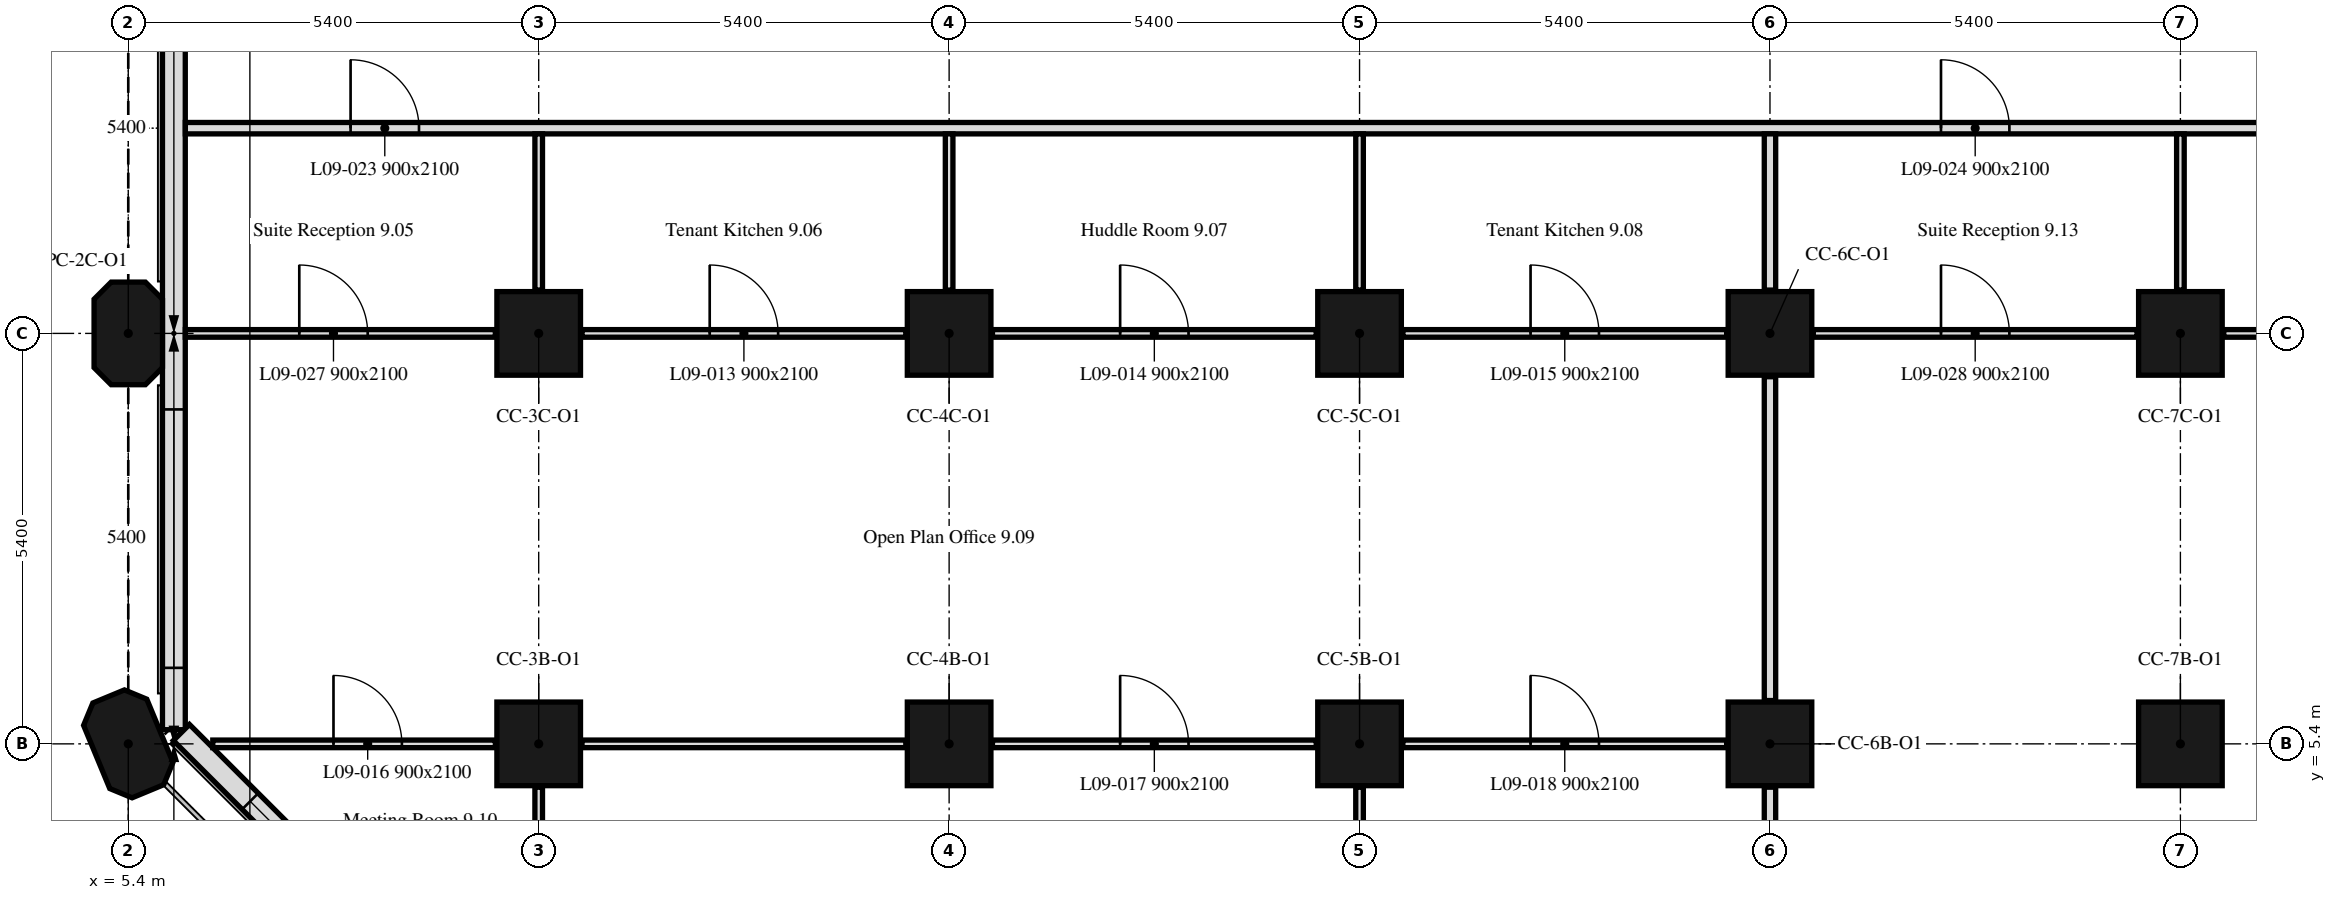
"""IFC4 building model, lengths in metres.
Left out: names, types, materials, properties, quantities, classifications, styles, units other than length and angle.
Written with IfcOpenShell. Run it as: python <this file> out.ifc"""

import sys

from ifc_helpers import new_model, si_unit, direction, frame, frame_2d, origin, origin_2d, place, context, subcontext, project, spatial, polyline, rectangle, outline, extrude, element, fill, save


model = new_model("IFC4")
c1 = context("Model", 3, precision=1e-05, world=origin(), true_north=direction((0.0, 1.0)))
c2 = subcontext(c1, "Body", "Model", "MODEL_VIEW")
j1 = project(units=[si_unit("LENGTHUNIT", "METRE"), si_unit("PLANEANGLEUNIT", "RADIAN")], contexts=[c1])
p1 = place(None, origin())
s1 = spatial("IfcSite", under=j1, at=p1, CompositionType="ELEMENT")
p2 = place(p1, origin())
s2 = spatial("IfcBuilding", under=s1, at=p2, CompositionType="ELEMENT")
p3 = place(p2, frame((0.0, 0.0, 45.0)))
s3 = spatial("IfcBuildingStorey", under=s2, at=p3, CompositionType="ELEMENT", Elevation=45.0)
p4 = place(p3, frame((5.4, 5.4, 0.0), z_axis=(0.0, 0.0, 1.0), x_axis=(-0.382683432365, 0.923879532511, 0.0)))
e1 = element("IfcColumn", 1, at=p4, inside=s3, PredefinedType="COLUMN", context=c2, shape_type="SweptSolid", body=[
    extrude(outline(polyline([(-0.45, -0.45), (0.45, -0.45), (0.675, -0.225), (0.675, 0.225), (0.45, 0.45), (-0.45, 0.45), (-0.675, 0.225), (-0.675, -0.225), (-0.45, -0.45)])), origin(), (0.0, 0.0, 1.0), 3.5),
])
for number, where, z_axis, x_axis in (
    (2, (10.8, 5.4, 0.0), (0.0, 0.0, 1.0), (1.0, 0.0, 0.0)),
    (3, (16.2, 5.4, 0.0), (0.0, 0.0, 1.0), (1.0, 0.0, 0.0)),
    (4, (21.6, 5.4, 0.0), (0.0, 0.0, 1.0), (1.0, 0.0, 0.0)),
    (5, (27.0, 5.4, 0.0), (0.0, 0.0, 1.0), (1.0, 0.0, 0.0)),
    (6, (32.4, 5.4, 0.0), (0.0, 0.0, 1.0), (1.0, 0.0, 0.0)),
):
    element("IfcColumn", number, at=place(p3, frame(where, z_axis=z_axis, x_axis=x_axis)), inside=s3, PredefinedType="COLUMN", context=c2, shape_type="SweptSolid", body=[
        extrude(rectangle(XDim=1.1, YDim=1.1, at=origin_2d()), origin(), (0.0, 0.0, 1.0), 3.5),
    ])
p5 = place(p3, frame((5.4, 10.8, 0.0), z_axis=(0.0, 0.0, 1.0), x_axis=(0.0, 1.0, 0.0)))
e7 = element("IfcColumn", 7, at=p5, inside=s3, PredefinedType="COLUMN", context=c2, shape_type="SweptSolid", body=[
    extrude(outline(polyline([(-0.45, -0.45), (0.45, -0.45), (0.675, -0.225), (0.675, 0.225), (0.45, 0.45), (-0.45, 0.45), (-0.675, 0.225), (-0.675, -0.225), (-0.45, -0.45)])), origin(), (0.0, 0.0, 1.0), 3.5),
])
for number, where, z_axis, x_axis in (
    (8, (10.8, 10.8, 0.0), (0.0, 0.0, 1.0), (1.0, 0.0, 0.0)),
    (9, (16.2, 10.8, 0.0), (0.0, 0.0, 1.0), (1.0, 0.0, 0.0)),
    (10, (21.6, 10.8, 0.0), (0.0, 0.0, 1.0), (1.0, 0.0, 0.0)),
    (11, (27.0, 10.8, 0.0), (0.0, 0.0, 1.0), (1.0, 0.0, 0.0)),
    (12, (32.4, 10.8, 0.0), (0.0, 0.0, 1.0), (1.0, 0.0, 0.0)),
):
    element("IfcColumn", number, at=place(p3, frame(where, z_axis=z_axis, x_axis=x_axis)), inside=s3, PredefinedType="COLUMN", context=c2, shape_type="SweptSolid", body=[
        extrude(rectangle(XDim=1.1, YDim=1.1, at=origin_2d()), origin(), (0.0, 0.0, 1.0), 3.5),
    ])
p6 = place(p3, frame((6.0, 16.2, 0.0), z_axis=(0.0, 0.0, 1.0), x_axis=(0.0, -1.0, 0.0)))
e13 = element("IfcWall", 13, at=p6, inside=s3, PredefinedType="SOLIDWALL", context=c2, shape_type="SweptSolid", body=[
    extrude(rectangle(XDim=10.614, YDim=0.3, at=frame_2d((5.307, 0.0))), origin(), (0.0, 0.0, 1.0), 3.5),
])
p7 = place(p6, frame((6.4, 0.0, 0.9)))
e14 = element("IfcOpeningElement", 14, at=p7, cuts=e13, PredefinedType="OPENING", context=c2, shape_type="SweptSolid", body=[
    extrude(rectangle(XDim=3.4, YDim=1.7, at=frame_2d((1.7, 0.85))), frame((0.0, 0.16, 0.0), z_axis=(0.0, -1.0, 0.0), x_axis=(1.0, 0.0, 0.0)), (0.0, 0.0, 1.0), 0.32),
])
p8 = place(p3, frame((6.099, 5.55, 0.0), z_axis=(0.0, 0.0, 1.0), x_axis=(0.707106781187, -0.707106781187, 0.0)))
e15 = element("IfcWall", 15, at=p8, inside=s3, PredefinedType="SOLIDWALL", context=c2, shape_type="SweptSolid", body=[
    extrude(rectangle(XDim=6.86, YDim=0.3, at=frame_2d((3.43, 0.0))), origin(), (0.0, 0.0, 1.0), 3.5),
])
p9 = place(p8, frame((1.28, 0.0, 0.9)))
e16 = element("IfcOpeningElement", 16, at=p9, cuts=e15, PredefinedType="OPENING", context=c2, shape_type="SweptSolid", body=[
    extrude(rectangle(XDim=1.1, YDim=1.7, at=frame_2d((0.55, 0.85))), frame((0.0, 0.16, 0.0), z_axis=(0.0, -1.0, 0.0), x_axis=(1.0, 0.0, 0.0)), (0.0, 0.0, 1.0), 0.32),
])
p10 = place(p8, frame((4.48, 0.0, 0.9)))
e17 = element("IfcOpeningElement", 17, at=p10, cuts=e15, PredefinedType="OPENING", context=c2, shape_type="SweptSolid", body=[
    extrude(rectangle(XDim=1.1, YDim=1.7, at=frame_2d((0.55, 0.85))), frame((0.0, 0.16, 0.0), z_axis=(0.0, -1.0, 0.0), x_axis=(1.0, 0.0, 0.0)), (0.0, 0.0, 1.0), 0.32),
])
p11 = place(p3, frame((6.151, 13.5, 0.0), z_axis=(0.0, 0.0, 1.0), x_axis=(1.0, 0.0, 0.0)))
e18 = element("IfcWall", 18, at=p11, inside=s3, PredefinedType="PARTITIONING", context=c2, shape_type="SweptSolid", body=[
    extrude(rectangle(XDim=41.698, YDim=0.15, at=frame_2d((20.849, 0.0))), origin(), (0.0, 0.0, 1.0), 2.75),
])
p12 = place(p11, frame((2.174, 0.0, 0.0)))
e19 = element("IfcOpeningElement", 19, at=p12, cuts=e18, PredefinedType="OPENING", context=c2, shape_type="SweptSolid", body=[
    extrude(rectangle(XDim=0.9, YDim=2.1, at=frame_2d((0.45, 1.05))), frame((0.0, 0.075, 0.0), z_axis=(0.0, -1.0, 0.0), x_axis=(1.0, 0.0, 0.0)), (0.0, 0.0, 1.0), 0.15),
])
p13 = place(p11, frame((23.099, 0.0, 0.0)))
e20 = element("IfcOpeningElement", 20, at=p13, cuts=e18, PredefinedType="OPENING", context=c2, shape_type="SweptSolid", body=[
    extrude(rectangle(XDim=0.9, YDim=2.1, at=frame_2d((0.45, 1.05))), frame((0.0, 0.075, 0.0), z_axis=(0.0, -1.0, 0.0), x_axis=(1.0, 0.0, 0.0)), (0.0, 0.0, 1.0), 0.15),
])
p14 = place(p3, frame((6.151, 10.8, 0.0), z_axis=(0.0, 0.0, 1.0), x_axis=(1.0, 0.0, 0.0)))
e21 = element("IfcWall", 21, at=p14, inside=s3, PredefinedType="PARTITIONING", context=c2, shape_type="SweptSolid", body=[
    extrude(rectangle(XDim=4.079, YDim=0.1, at=frame_2d((2.04, 0.0))), origin(), (0.0, 0.0, 1.0), 3.5),
])
p15 = place(p14, frame((1.499, 0.0, 0.0)))
e22 = element("IfcOpeningElement", 22, at=p15, cuts=e21, PredefinedType="OPENING", context=c2, shape_type="SweptSolid", body=[
    extrude(rectangle(XDim=0.9, YDim=2.1, at=frame_2d((0.45, 1.05))), frame((0.0, 0.05, 0.0), z_axis=(0.0, -1.0, 0.0), x_axis=(1.0, 0.0, 0.0)), (0.0, 0.0, 1.0), 0.1),
])
p16 = place(p3, frame((10.8, 11.37, 0.0), z_axis=(0.0, 0.0, 1.0), x_axis=(0.0, 1.0, 0.0)))
e23 = element("IfcWall", 23, at=p16, inside=s3, PredefinedType="PARTITIONING", context=c2, shape_type="SweptSolid", body=[
    extrude(rectangle(XDim=2.055, YDim=0.1, at=frame_2d((1.027, 0.0))), origin(), (0.0, 0.0, 1.0), 3.5),
])
p17 = place(p3, frame((11.37, 10.8, 0.0), z_axis=(0.0, 0.0, 1.0), x_axis=(1.0, 0.0, 0.0)))
e24 = element("IfcWall", 24, at=p17, inside=s3, PredefinedType="PARTITIONING", context=c2, shape_type="SweptSolid", body=[
    extrude(rectangle(XDim=4.26, YDim=0.1, at=frame_2d((2.13, 0.0))), origin(), (0.0, 0.0, 1.0), 3.5),
])
p18 = place(p17, frame((1.68, 0.0, 0.0)))
e25 = element("IfcOpeningElement", 25, at=p18, cuts=e24, PredefinedType="OPENING", context=c2, shape_type="SweptSolid", body=[
    extrude(rectangle(XDim=0.9, YDim=2.1, at=frame_2d((0.45, 1.05))), frame((0.0, 0.05, 0.0), z_axis=(0.0, -1.0, 0.0), x_axis=(1.0, 0.0, 0.0)), (0.0, 0.0, 1.0), 0.1),
])
p19 = place(p3, frame((16.2, 11.37, 0.0), z_axis=(0.0, 0.0, 1.0), x_axis=(0.0, 1.0, 0.0)))
e26 = element("IfcWall", 26, at=p19, inside=s3, PredefinedType="PARTITIONING", context=c2, shape_type="SweptSolid", body=[
    extrude(rectangle(XDim=2.055, YDim=0.1, at=frame_2d((1.027, 0.0))), origin(), (0.0, 0.0, 1.0), 2.75),
])
p20 = place(p3, frame((16.77, 10.8, 0.0), z_axis=(0.0, 0.0, 1.0), x_axis=(1.0, 0.0, 0.0)))
e27 = element("IfcWall", 27, at=p20, inside=s3, PredefinedType="PARTITIONING", context=c2, shape_type="SweptSolid", body=[
    extrude(rectangle(XDim=4.26, YDim=0.1, at=frame_2d((2.13, 0.0))), origin(), (0.0, 0.0, 1.0), 3.5),
])
p21 = place(p20, frame((1.68, 0.0, 0.0)))
e28 = element("IfcOpeningElement", 28, at=p21, cuts=e27, PredefinedType="OPENING", context=c2, shape_type="SweptSolid", body=[
    extrude(rectangle(XDim=0.9, YDim=2.1, at=frame_2d((0.45, 1.05))), frame((0.0, 0.05, 0.0), z_axis=(0.0, -1.0, 0.0), x_axis=(1.0, 0.0, 0.0)), (0.0, 0.0, 1.0), 0.1),
])
p22 = place(p3, frame((21.6, 11.37, 0.0), z_axis=(0.0, 0.0, 1.0), x_axis=(0.0, 1.0, 0.0)))
e29 = element("IfcWall", 29, at=p22, inside=s3, PredefinedType="PARTITIONING", context=c2, shape_type="SweptSolid", body=[
    extrude(rectangle(XDim=2.055, YDim=0.1, at=frame_2d((1.027, 0.0))), origin(), (0.0, 0.0, 1.0), 2.75),
])
p23 = place(p3, frame((22.17, 10.8, 0.0), z_axis=(0.0, 0.0, 1.0), x_axis=(1.0, 0.0, 0.0)))
e30 = element("IfcWall", 30, at=p23, inside=s3, PredefinedType="PARTITIONING", context=c2, shape_type="SweptSolid", body=[
    extrude(rectangle(XDim=4.26, YDim=0.1, at=frame_2d((2.13, 0.0))), origin(), (0.0, 0.0, 1.0), 3.5),
])
p24 = place(p23, frame((1.68, 0.0, 0.0)))
e31 = element("IfcOpeningElement", 31, at=p24, cuts=e30, PredefinedType="OPENING", context=c2, shape_type="SweptSolid", body=[
    extrude(rectangle(XDim=0.9, YDim=2.1, at=frame_2d((0.45, 1.05))), frame((0.0, 0.05, 0.0), z_axis=(0.0, -1.0, 0.0), x_axis=(1.0, 0.0, 0.0)), (0.0, 0.0, 1.0), 0.1),
])
p25 = place(p3, frame((27.0, 11.37, 0.0), z_axis=(0.0, 0.0, 1.0), x_axis=(0.0, 1.0, 0.0)))
e32 = element("IfcWall", 32, at=p25, inside=s3, PredefinedType="PARTITIONING", context=c2, shape_type="SweptSolid", body=[
    extrude(rectangle(XDim=2.055, YDim=0.15, at=frame_2d((1.027, 0.0))), origin(), (0.0, 0.0, 1.0), 2.75),
])
p26 = place(p3, frame((6.512, 5.4, 0.0), z_axis=(0.0, 0.0, 1.0), x_axis=(1.0, 0.0, 0.0)))
e33 = element("IfcWall", 33, at=p26, inside=s3, PredefinedType="PARTITIONING", context=c2, shape_type="SweptSolid", body=[
    extrude(rectangle(XDim=3.718, YDim=0.1, at=frame_2d((1.859, 0.0))), origin(), (0.0, 0.0, 1.0), 3.5),
])
p27 = place(p26, frame((1.588, 0.0, 0.0)))
e34 = element("IfcOpeningElement", 34, at=p27, cuts=e33, PredefinedType="OPENING", context=c2, shape_type="SweptSolid", body=[
    extrude(rectangle(XDim=0.9, YDim=2.1, at=frame_2d((0.45, 1.05))), frame((0.0, 0.05, 0.0), z_axis=(0.0, -1.0, 0.0), x_axis=(1.0, 0.0, 0.0)), (0.0, 0.0, 1.0), 0.1),
])
p28 = place(p3, frame((11.37, 5.4, 0.0), z_axis=(0.0, 0.0, 1.0), x_axis=(1.0, 0.0, 0.0)))
e35 = element("IfcWall", 35, at=p28, inside=s3, PredefinedType="PARTITIONING", context=c2, shape_type="SweptSolid", body=[
    extrude(rectangle(XDim=4.26, YDim=0.1, at=frame_2d((2.13, 0.0))), origin(), (0.0, 0.0, 1.0), 3.5),
])
p29 = place(p3, frame((16.77, 5.4, 0.0), z_axis=(0.0, 0.0, 1.0), x_axis=(1.0, 0.0, 0.0)))
e36 = element("IfcWall", 36, at=p29, inside=s3, PredefinedType="PARTITIONING", context=c2, shape_type="SweptSolid", body=[
    extrude(rectangle(XDim=4.26, YDim=0.1, at=frame_2d((2.13, 0.0))), origin(), (0.0, 0.0, 1.0), 3.5),
])
p30 = place(p29, frame((1.68, 0.0, 0.0)))
e37 = element("IfcOpeningElement", 37, at=p30, cuts=e36, PredefinedType="OPENING", context=c2, shape_type="SweptSolid", body=[
    extrude(rectangle(XDim=0.9, YDim=2.1, at=frame_2d((0.45, 1.05))), frame((0.0, 0.05, 0.0), z_axis=(0.0, -1.0, 0.0), x_axis=(1.0, 0.0, 0.0)), (0.0, 0.0, 1.0), 0.1),
])
p31 = place(p3, frame((22.17, 5.4, 0.0), z_axis=(0.0, 0.0, 1.0), x_axis=(1.0, 0.0, 0.0)))
e38 = element("IfcWall", 38, at=p31, inside=s3, PredefinedType="PARTITIONING", context=c2, shape_type="SweptSolid", body=[
    extrude(rectangle(XDim=4.26, YDim=0.1, at=frame_2d((2.13, 0.0))), origin(), (0.0, 0.0, 1.0), 3.5),
])
p32 = place(p31, frame((1.68, 0.0, 0.0)))
e39 = element("IfcOpeningElement", 39, at=p32, cuts=e38, PredefinedType="OPENING", context=c2, shape_type="SweptSolid", body=[
    extrude(rectangle(XDim=0.9, YDim=2.1, at=frame_2d((0.45, 1.05))), frame((0.0, 0.05, 0.0), z_axis=(0.0, -1.0, 0.0), x_axis=(1.0, 0.0, 0.0)), (0.0, 0.0, 1.0), 0.1),
])
p33 = place(p3, frame((27.0, 5.97, 0.0), z_axis=(0.0, 0.0, 1.0), x_axis=(0.0, 1.0, 0.0)))
e40 = element("IfcWall", 40, at=p33, inside=s3, PredefinedType="PARTITIONING", context=c2, shape_type="SweptSolid", body=[
    extrude(rectangle(XDim=4.26, YDim=0.15, at=frame_2d((2.13, 0.0))), origin(), (0.0, 0.0, 1.0), 2.75),
])
p34 = place(p3, frame((10.8, 1.112, 0.0), z_axis=(0.0, 0.0, 1.0), x_axis=(0.0, 1.0, 0.0)))
e41 = element("IfcWall", 41, at=p34, inside=s3, PredefinedType="PARTITIONING", context=c2, shape_type="SweptSolid", body=[
    extrude(rectangle(XDim=3.718, YDim=0.1, at=frame_2d((1.859, 0.0))), origin(), (0.0, 0.0, 1.0), 3.5),
])
p35 = place(p3, frame((21.6, 0.751, 0.0), z_axis=(0.0, 0.0, 1.0), x_axis=(0.0, 1.0, 0.0)))
e42 = element("IfcWall", 42, at=p35, inside=s3, PredefinedType="PARTITIONING", context=c2, shape_type="SweptSolid", body=[
    extrude(rectangle(XDim=4.079, YDim=0.1, at=frame_2d((2.04, 0.0))), origin(), (0.0, 0.0, 1.0), 2.75),
])
p36 = place(p3, frame((27.0, 0.751, 0.0), z_axis=(0.0, 0.0, 1.0), x_axis=(0.0, 1.0, 0.0)))
e43 = element("IfcWall", 43, at=p36, inside=s3, PredefinedType="PARTITIONING", context=c2, shape_type="SweptSolid", body=[
    extrude(rectangle(XDim=4.079, YDim=0.15, at=frame_2d((2.04, 0.0))), origin(), (0.0, 0.0, 1.0), 2.75),
])
p37 = place(p3, frame((27.57, 10.8, 0.0), z_axis=(0.0, 0.0, 1.0), x_axis=(1.0, 0.0, 0.0)))
e44 = element("IfcWall", 44, at=p37, inside=s3, PredefinedType="PARTITIONING", context=c2, shape_type="SweptSolid", body=[
    extrude(rectangle(XDim=4.26, YDim=0.1, at=frame_2d((2.13, 0.0))), origin(), (0.0, 0.0, 1.0), 3.5),
])
p38 = place(p37, frame((1.68, 0.0, 0.0)))
e45 = element("IfcOpeningElement", 45, at=p38, cuts=e44, PredefinedType="OPENING", context=c2, shape_type="SweptSolid", body=[
    extrude(rectangle(XDim=0.9, YDim=2.1, at=frame_2d((0.45, 1.05))), frame((0.0, 0.05, 0.0), z_axis=(0.0, -1.0, 0.0), x_axis=(1.0, 0.0, 0.0)), (0.0, 0.0, 1.0), 0.1),
])
p39 = place(p3, frame((32.4, 11.37, 0.0), z_axis=(0.0, 0.0, 1.0), x_axis=(0.0, 1.0, 0.0)))
e46 = element("IfcWall", 46, at=p39, inside=s3, PredefinedType="PARTITIONING", context=c2, shape_type="SweptSolid", body=[
    extrude(rectangle(XDim=2.055, YDim=0.1, at=frame_2d((1.027, 0.0))), origin(), (0.0, 0.0, 1.0), 2.75),
])
p40 = place(p3, frame((32.97, 10.8, 0.0), z_axis=(0.0, 0.0, 1.0), x_axis=(1.0, 0.0, 0.0)))
e47 = element("IfcWall", 47, at=p40, inside=s3, PredefinedType="PARTITIONING", context=c2, shape_type="SweptSolid", body=[
    extrude(rectangle(XDim=4.26, YDim=0.1, at=frame_2d((2.13, 0.0))), origin(), (0.0, 0.0, 1.0), 2.75),
])
p41 = place(p40, frame((1.68, 0.0, 0.0)))
e48 = element("IfcOpeningElement", 48, at=p41, cuts=e47, PredefinedType="OPENING", context=c2, shape_type="SweptSolid", body=[
    extrude(rectangle(XDim=0.9, YDim=2.1, at=frame_2d((0.45, 1.05))), frame((0.0, 0.05, 0.0), z_axis=(0.0, -1.0, 0.0), x_axis=(1.0, 0.0, 0.0)), (0.0, 0.0, 1.0), 0.1),
])
p42 = place(p7, origin())
e49 = element("IfcWindow", 49, at=p42, inside=s3, PartitioningType="SINGLE_PANEL", PredefinedType="WINDOW", context=c2, shape_type="SweptSolid", body=[
    extrude(rectangle(XDim=3.4, YDim=1.7, at=frame_2d((1.7, 0.85))), frame((0.0, 0.03, 0.0), z_axis=(0.0, -1.0, 0.0), x_axis=(1.0, 0.0, 0.0)), (0.0, 0.0, 1.0), 0.06),
])
fill(e14, e49)
p43 = place(p9, origin())
e50 = element("IfcWindow", 50, at=p43, inside=s3, PartitioningType="SINGLE_PANEL", PredefinedType="WINDOW", context=c2, shape_type="SweptSolid", body=[
    extrude(rectangle(XDim=1.1, YDim=1.7, at=frame_2d((0.55, 0.85))), frame((0.0, 0.03, 0.0), z_axis=(0.0, -1.0, 0.0), x_axis=(1.0, 0.0, 0.0)), (0.0, 0.0, 1.0), 0.06),
])
fill(e16, e50)
p44 = place(p18, origin())
e51 = element("IfcDoor", 51, at=p44, inside=s3, OperationType="SINGLE_SWING_LEFT", PredefinedType="DOOR", context=c2, shape_type="SweptSolid", body=[
    extrude(rectangle(XDim=0.9, YDim=2.1, at=frame_2d((0.45, 1.05))), frame((0.0, 0.025, 0.0), z_axis=(0.0, -1.0, 0.0), x_axis=(1.0, 0.0, 0.0)), (0.0, 0.0, 1.0), 0.05),
])
fill(e25, e51)
p45 = place(p21, origin())
e52 = element("IfcDoor", 52, at=p45, inside=s3, OperationType="SINGLE_SWING_LEFT", PredefinedType="DOOR", context=c2, shape_type="SweptSolid", body=[
    extrude(rectangle(XDim=0.9, YDim=2.1, at=frame_2d((0.45, 1.05))), frame((0.0, 0.025, 0.0), z_axis=(0.0, -1.0, 0.0), x_axis=(1.0, 0.0, 0.0)), (0.0, 0.0, 1.0), 0.05),
])
fill(e28, e52)
p46 = place(p24, origin())
e53 = element("IfcDoor", 53, at=p46, inside=s3, OperationType="SINGLE_SWING_RIGHT", PredefinedType="DOOR", context=c2, shape_type="SweptSolid", body=[
    extrude(rectangle(XDim=0.9, YDim=2.1, at=frame_2d((0.45, 1.05))), frame((0.0, 0.025, 0.0), z_axis=(0.0, -1.0, 0.0), x_axis=(1.0, 0.0, 0.0)), (0.0, 0.0, 1.0), 0.05),
])
fill(e31, e53)
p47 = place(p27, origin())
e54 = element("IfcDoor", 54, at=p47, inside=s3, OperationType="SINGLE_SWING_LEFT", PredefinedType="DOOR", context=c2, shape_type="SweptSolid", body=[
    extrude(rectangle(XDim=0.9, YDim=2.1, at=frame_2d((0.45, 1.05))), frame((0.0, 0.025, 0.0), z_axis=(0.0, -1.0, 0.0), x_axis=(1.0, 0.0, 0.0)), (0.0, 0.0, 1.0), 0.05),
])
fill(e34, e54)
p48 = place(p30, origin())
e55 = element("IfcDoor", 55, at=p48, inside=s3, OperationType="SINGLE_SWING_LEFT", PredefinedType="DOOR", context=c2, shape_type="SweptSolid", body=[
    extrude(rectangle(XDim=0.9, YDim=2.1, at=frame_2d((0.45, 1.05))), frame((0.0, 0.025, 0.0), z_axis=(0.0, -1.0, 0.0), x_axis=(1.0, 0.0, 0.0)), (0.0, 0.0, 1.0), 0.05),
])
fill(e37, e55)
p49 = place(p32, origin())
e56 = element("IfcDoor", 56, at=p49, inside=s3, OperationType="SINGLE_SWING_LEFT", PredefinedType="DOOR", context=c2, shape_type="SweptSolid", body=[
    extrude(rectangle(XDim=0.9, YDim=2.1, at=frame_2d((0.45, 1.05))), frame((0.0, 0.025, 0.0), z_axis=(0.0, -1.0, 0.0), x_axis=(1.0, 0.0, 0.0)), (0.0, 0.0, 1.0), 0.05),
])
fill(e39, e56)
p50 = place(p12, origin())
e57 = element("IfcDoor", 57, at=p50, inside=s3, OperationType="SINGLE_SWING_LEFT", PredefinedType="DOOR", context=c2, shape_type="SweptSolid", body=[
    extrude(rectangle(XDim=0.9, YDim=2.1, at=frame_2d((0.45, 1.05))), frame((0.0, 0.025, 0.0), z_axis=(0.0, -1.0, 0.0), x_axis=(1.0, 0.0, 0.0)), (0.0, 0.0, 1.0), 0.05),
])
fill(e19, e57)
p51 = place(p13, origin())
e58 = element("IfcDoor", 58, at=p51, inside=s3, OperationType="SINGLE_SWING_LEFT", PredefinedType="DOOR", context=c2, shape_type="SweptSolid", body=[
    extrude(rectangle(XDim=0.9, YDim=2.1, at=frame_2d((0.45, 1.05))), frame((0.0, 0.025, 0.0), z_axis=(0.0, -1.0, 0.0), x_axis=(1.0, 0.0, 0.0)), (0.0, 0.0, 1.0), 0.05),
])
fill(e20, e58)
p52 = place(p15, origin())
e59 = element("IfcDoor", 59, at=p52, inside=s3, OperationType="SINGLE_SWING_RIGHT", PredefinedType="DOOR", context=c2, shape_type="SweptSolid", body=[
    extrude(rectangle(XDim=0.9, YDim=2.1, at=frame_2d((0.45, 1.05))), frame((0.0, 0.025, 0.0), z_axis=(0.0, -1.0, 0.0), x_axis=(1.0, 0.0, 0.0)), (0.0, 0.0, 1.0), 0.05),
])
fill(e22, e59)
p53 = place(p38, origin())
e60 = element("IfcDoor", 60, at=p53, inside=s3, OperationType="SINGLE_SWING_RIGHT", PredefinedType="DOOR", context=c2, shape_type="SweptSolid", body=[
    extrude(rectangle(XDim=0.9, YDim=2.1, at=frame_2d((0.45, 1.05))), frame((0.0, 0.025, 0.0), z_axis=(0.0, -1.0, 0.0), x_axis=(1.0, 0.0, 0.0)), (0.0, 0.0, 1.0), 0.05),
])
fill(e45, e60)
save(model, sys.argv[1])
